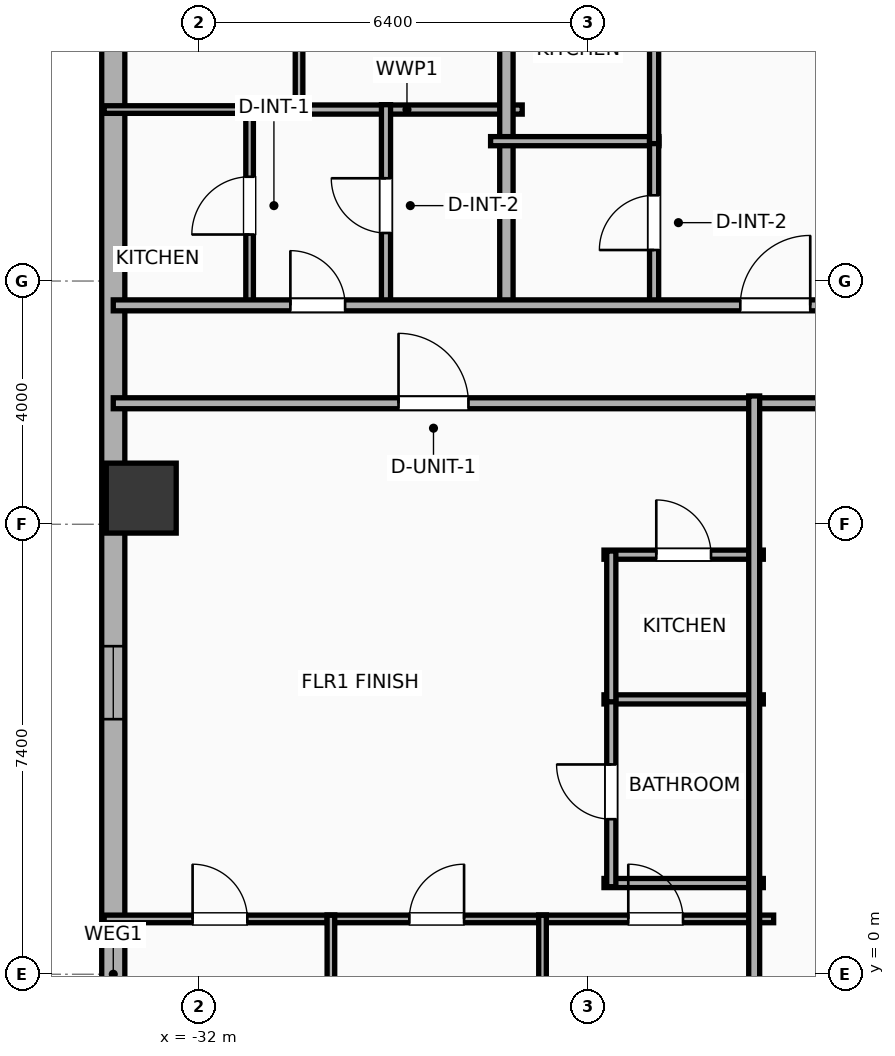
"""IFC4 building model, lengths in metres.
Left out: names, types, materials, properties, quantities, classifications, styles, units other than length and angle.
Written with IfcOpenShell. Run it as: python <this file> out.ifc"""

import sys

from ifc_helpers import new_model, si_unit, direction, frame, frame_2d, origin, origin_2d, place, context, subcontext, project, spatial, rectangle, hollow_rectangle, extrude, element, fill, save


model = new_model("IFC4")
c1 = context("Model", 3, precision=1e-05, world=origin(), true_north=direction((0.0, 1.0)))
c2 = subcontext(c1, "Body", "Model", "MODEL_VIEW")
j1 = project(units=[si_unit("LENGTHUNIT", "METRE"), si_unit("PLANEANGLEUNIT", "RADIAN")], contexts=[c1])
p1 = place(None, origin())
s1 = spatial("IfcSite", under=j1, at=p1, CompositionType="ELEMENT")
p2 = place(p1, origin())
s2 = spatial("IfcBuilding", under=s1, at=p2, CompositionType="ELEMENT")
p3 = place(p2, frame((0.0, 0.0, 65.0)))
s3 = spatial("IfcBuildingStorey", under=s2, at=p3, CompositionType="ELEMENT", Elevation=65.0)
p4 = place(p3, frame((-32.95, 7.83, 0.0), z_axis=(0.0, 0.0, 1.0), x_axis=(1.0, 0.0, 0.0)))
e1 = element("IfcColumn", 1, at=p4, inside=s3, PredefinedType="COLUMN", context=c2, shape_type="SweptSolid", body=[
    extrude(hollow_rectangle(XDim=1.15, YDim=1.15, WallThickness=0.04, at=origin_2d()), origin(), (0.0, 0.0, 1.0), 3.9),
])
p5 = place(p3, frame((-33.41, -18.381, 0.0), z_axis=(0.0, 0.0, 1.0), x_axis=(0.0, 1.0, 0.0)))
e2 = element("IfcWall", 2, at=p5, inside=s3, PredefinedType="ELEMENTEDWALL", context=c2, shape_type="SweptSolid", body=[
    extrude(rectangle(XDim=36.763, YDim=0.38, at=frame_2d((18.381, 0.0))), origin(), (0.0, 0.0, 1.0), 3.65),
])
p6 = place(p5, frame((33.637, 0.0, 0.75)))
e3 = element("IfcOpeningElement", 3, at=p6, cuts=e2, PredefinedType="OPENING", context=c2, shape_type="SweptSolid", body=[
    extrude(rectangle(XDim=1.2, YDim=2.05, at=frame_2d((0.6, 1.025))), frame((0.0, 0.2, 0.0), z_axis=(0.0, -1.0, 0.0), x_axis=(1.0, 0.0, 0.0)), (0.0, 0.0, 1.0), 0.4),
])
p7 = place(p5, frame((22.576, 0.0, 0.75)))
e4 = element("IfcOpeningElement", 4, at=p7, cuts=e2, PredefinedType="OPENING", context=c2, shape_type="SweptSolid", body=[
    extrude(rectangle(XDim=1.2, YDim=2.05, at=frame_2d((0.6, 1.025))), frame((0.0, 0.2, 0.0), z_axis=(0.0, -1.0, 0.0), x_axis=(1.0, 0.0, 0.0)), (0.0, 0.0, 1.0), 0.4),
])
p8 = place(p5, frame((13.126, 0.0, 0.75)))
e5 = element("IfcOpeningElement", 5, at=p8, cuts=e2, PredefinedType="OPENING", context=c2, shape_type="SweptSolid", body=[
    extrude(rectangle(XDim=1.2, YDim=2.05, at=frame_2d((0.6, 1.025))), frame((0.0, 0.2, 0.0), z_axis=(0.0, -1.0, 0.0), x_axis=(1.0, 0.0, 0.0)), (0.0, 0.0, 1.0), 0.4),
])
p9 = place(p3, frame((-33.41, 9.39, 0.0), z_axis=(0.0, 0.0, 1.0), x_axis=(1.0, 0.0, 0.0)))
e6 = element("IfcWall", 6, at=p9, inside=s3, PredefinedType="PARTITIONING", context=c2, shape_type="SweptSolid", body=[
    extrude(rectangle(XDim=23.53, YDim=0.18, at=frame_2d((11.765, 0.0))), origin(), (0.0, 0.0, 1.0), 3.65),
])
p10 = place(p9, frame((4.691, 0.0, 0.0)))
e7 = element("IfcOpeningElement", 7, at=p10, cuts=e6, PredefinedType="OPENING", context=c2, shape_type="SweptSolid", body=[
    extrude(rectangle(XDim=1.15, YDim=2.05, at=frame_2d((0.575, 1.025))), frame((0.0, 0.1, 0.0), z_axis=(0.0, -1.0, 0.0), x_axis=(1.0, 0.0, 0.0)), (0.0, 0.0, 1.0), 0.2),
])
p11 = place(p3, frame((-30.355, 14.14, 0.0), z_axis=(0.0, 0.0, 1.0), x_axis=(0.0, 1.0, 0.0)))
e8 = element("IfcWall", 8, at=p11, inside=s3, PredefinedType="PARTITIONING", context=c2, shape_type="SweptSolid", body=[
    extrude(rectangle(XDim=8.069, YDim=0.125, at=frame_2d((4.035, 0.0))), origin(), (0.0, 0.0, 1.0), 3.65),
])
p12 = place(p11, frame((1.487, 0.0, 0.0)))
e9 = element("IfcOpeningElement", 9, at=p12, cuts=e8, PredefinedType="OPENING", context=c2, shape_type="SweptSolid", body=[
    extrude(rectangle(XDim=0.9, YDim=2.05, at=frame_2d((0.45, 1.025))), frame((0.0, 0.073, 0.0), z_axis=(0.0, -1.0, 0.0), x_axis=(1.0, 0.0, 0.0)), (0.0, 0.0, 1.0), 0.145),
])
p13 = place(p3, frame((-30.475, 14.22, 0.0), z_axis=(0.0, 0.0, 1.0), x_axis=(1.0, 0.0, 0.0)))
e10 = element("IfcWall", 10, at=p13, inside=s3, PredefinedType="PLUMBINGWALL", context=c2, shape_type="SweptSolid", body=[
    extrude(rectangle(XDim=3.79, YDim=0.15, at=frame_2d((1.895, 0.0))), origin(), (0.0, 0.0, 1.0), 3.65),
])
p14 = place(p3, frame((-31.168, 10.98, 0.0), z_axis=(0.0, 0.0, 1.0), x_axis=(0.0, 1.0, 0.0)))
e11 = element("IfcWall", 11, at=p14, inside=s3, PredefinedType="PARTITIONING", context=c2, shape_type="SweptSolid", body=[
    extrude(rectangle(XDim=3.32, YDim=0.125, at=frame_2d((1.66, 0.0))), origin(), (0.0, 0.0, 1.0), 3.65),
])
p15 = place(p14, frame((1.185, 0.0, 0.0)))
e12 = element("IfcOpeningElement", 12, at=p15, cuts=e11, PredefinedType="OPENING", context=c2, shape_type="SweptSolid", body=[
    extrude(rectangle(XDim=0.95, YDim=2.05, at=frame_2d((0.475, 1.025))), frame((0.0, 0.073, 0.0), z_axis=(0.0, -1.0, 0.0), x_axis=(1.0, 0.0, 0.0)), (0.0, 0.0, 1.0), 0.145),
])
p16 = place(p3, frame((-33.56, 14.22, 0.0), z_axis=(0.0, 0.0, 1.0), x_axis=(1.0, 0.0, 0.0)))
e13 = element("IfcWall", 13, at=p16, inside=s3, PredefinedType="PARTITIONING", context=c2, shape_type="SweptSolid", body=[
    extrude(rectangle(XDim=2.512, YDim=0.125, at=frame_2d((1.256, 0.0))), origin(), (0.0, 0.0, 1.0), 3.65),
])
p17 = place(p3, frame((-28.925, 10.98, 0.0), z_axis=(0.0, 0.0, 1.0), x_axis=(0.0, 1.0, 0.0)))
e14 = element("IfcWall", 14, at=p17, inside=s3, PredefinedType="PLUMBINGWALL", context=c2, shape_type="SweptSolid", body=[
    extrude(rectangle(XDim=3.32, YDim=0.15, at=frame_2d((1.66, 0.0))), origin(), (0.0, 0.0, 1.0), 3.65),
])
p18 = place(p17, frame((1.21, 0.0, 0.0)))
e15 = element("IfcOpeningElement", 15, at=p18, cuts=e14, PredefinedType="OPENING", context=c2, shape_type="SweptSolid", body=[
    extrude(rectangle(XDim=0.9, YDim=2.05, at=frame_2d((0.45, 1.025))), frame((0.0, 0.085, 0.0), z_axis=(0.0, -1.0, 0.0), x_axis=(1.0, 0.0, 0.0)), (0.0, 0.0, 1.0), 0.17),
])
p19 = place(p3, frame((-26.945, 10.92, 0.0), z_axis=(0.0, 0.0, 1.0), x_axis=(0.0, 1.0, 0.0)))
e16 = element("IfcWall", 16, at=p19, inside=s3, PredefinedType="PARTITIONING", context=c2, shape_type="SweptSolid", body=[
    extrude(rectangle(XDim=11.29, YDim=0.22, at=frame_2d((5.645, 0.0))), origin(), (0.0, 0.0, 1.0), 3.65),
])
p20 = place(p3, frame((-27.205, 13.7, 0.0), z_axis=(0.0, 0.0, 1.0), x_axis=(1.0, 0.0, 0.0)))
e17 = element("IfcWall", 17, at=p20, inside=s3, PredefinedType="PLUMBINGWALL", context=c2, shape_type="SweptSolid", body=[
    extrude(rectangle(XDim=2.769, YDim=0.15, at=frame_2d((1.385, 0.0))), origin(), (0.0, 0.0, 1.0), 3.65),
])
p21 = place(p3, frame((-24.516, 10.98, 0.0), z_axis=(0.0, 0.0, 1.0), x_axis=(0.0, 1.0, 0.0)))
e18 = element("IfcWall", 18, at=p21, inside=s3, PredefinedType="PLUMBINGWALL", context=c2, shape_type="SweptSolid", body=[
    extrude(rectangle(XDim=2.76, YDim=0.15, at=frame_2d((1.38, 0.0))), origin(), (0.0, 0.0, 1.0), 3.65),
])
p22 = place(p21, frame((0.93, 0.0, 0.0)))
e19 = element("IfcOpeningElement", 19, at=p22, cuts=e18, PredefinedType="OPENING", context=c2, shape_type="SweptSolid", body=[
    extrude(rectangle(XDim=0.9, YDim=2.05, at=frame_2d((0.45, 1.025))), frame((0.0, 0.085, 0.0), z_axis=(0.0, -1.0, 0.0), x_axis=(1.0, 0.0, 0.0)), (0.0, 0.0, 1.0), 0.17),
])
p23 = place(p3, frame((-24.516, 13.66, 0.0), z_axis=(0.0, 0.0, 1.0), x_axis=(0.0, 1.0, 0.0)))
e20 = element("IfcWall", 20, at=p23, inside=s3, PredefinedType="PLUMBINGWALL", context=c2, shape_type="SweptSolid", body=[
    extrude(rectangle(XDim=8.598, YDim=0.15, at=frame_2d((4.299, 0.0))), origin(), (0.0, 0.0, 1.0), 3.65),
])
p24 = place(p23, frame((3.849, 0.0, 0.0)))
e21 = element("IfcOpeningElement", 21, at=p24, cuts=e20, PredefinedType="OPENING", context=c2, shape_type="SweptSolid", body=[
    extrude(rectangle(XDim=0.9, YDim=2.05, at=frame_2d((0.45, 1.025))), frame((0.0, 0.085, 0.0), z_axis=(0.0, -1.0, 0.0), x_axis=(1.0, 0.0, 0.0)), (0.0, 0.0, 1.0), 0.17),
])
p25 = place(p3, frame((-33.41, 11.0, 0.0), z_axis=(0.0, 0.0, 1.0), x_axis=(1.0, 0.0, 0.0)))
e22 = element("IfcWall", 22, at=p25, inside=s3, PredefinedType="PARTITIONING", context=c2, shape_type="SweptSolid", body=[
    extrude(rectangle(XDim=59.62, YDim=0.18, at=frame_2d((29.81, 0.0))), origin(), (0.0, 0.0, 1.0), 3.65),
])
p26 = place(p25, frame((2.913, 0.0, 0.0)))
e23 = element("IfcOpeningElement", 23, at=p26, cuts=e22, PredefinedType="OPENING", context=c2, shape_type="SweptSolid", body=[
    extrude(rectangle(XDim=0.9, YDim=2.05, at=frame_2d((0.45, 1.025))), frame((0.0, 0.1, 0.0), z_axis=(0.0, -1.0, 0.0), x_axis=(1.0, 0.0, 0.0)), (0.0, 0.0, 1.0), 0.2),
])
p27 = place(p25, frame((10.312, 0.0, 0.0)))
e24 = element("IfcOpeningElement", 24, at=p27, cuts=e22, PredefinedType="OPENING", context=c2, shape_type="SweptSolid", body=[
    extrude(rectangle(XDim=1.15, YDim=2.05, at=frame_2d((0.575, 1.025))), frame((0.0, 0.1, 0.0), z_axis=(0.0, -1.0, 0.0), x_axis=(1.0, 0.0, 0.0)), (0.0, 0.0, 1.0), 0.2),
])
p28 = place(p25, frame((15.85, 0.0, 0.0)))
e25 = element("IfcOpeningElement", 25, at=p28, cuts=e22, PredefinedType="OPENING", context=c2, shape_type="SweptSolid", body=[
    extrude(rectangle(XDim=0.9, YDim=2.05, at=frame_2d((0.45, 1.025))), frame((0.0, 0.1, 0.0), z_axis=(0.0, -1.0, 0.0), x_axis=(1.0, 0.0, 0.0)), (0.0, 0.0, 1.0), 0.2),
])
p29 = place(p25, frame((22.623, 0.0, 0.0)))
e26 = element("IfcOpeningElement", 26, at=p29, cuts=e22, PredefinedType="OPENING", context=c2, shape_type="SweptSolid", body=[
    extrude(rectangle(XDim=0.9, YDim=2.05, at=frame_2d((0.45, 1.025))), frame((0.0, 0.1, 0.0), z_axis=(0.0, -1.0, 0.0), x_axis=(1.0, 0.0, 0.0)), (0.0, 0.0, 1.0), 0.2),
])
p30 = place(p25, frame((29.622, 0.0, 0.0)))
e27 = element("IfcOpeningElement", 27, at=p30, cuts=e22, PredefinedType="OPENING", context=c2, shape_type="SweptSolid", body=[
    extrude(rectangle(XDim=0.9, YDim=2.05, at=frame_2d((0.45, 1.025))), frame((0.0, 0.1, 0.0), z_axis=(0.0, -1.0, 0.0), x_axis=(1.0, 0.0, 0.0)), (0.0, 0.0, 1.0), 0.2),
])
p31 = place(p25, frame((36.628, 0.0, 0.0)))
e28 = element("IfcOpeningElement", 28, at=p31, cuts=e22, PredefinedType="OPENING", context=c2, shape_type="SweptSolid", body=[
    extrude(rectangle(XDim=0.9, YDim=2.05, at=frame_2d((0.45, 1.025))), frame((0.0, 0.1, 0.0), z_axis=(0.0, -1.0, 0.0), x_axis=(1.0, 0.0, 0.0)), (0.0, 0.0, 1.0), 0.2),
])
p32 = place(p25, frame((43.627, 0.0, 0.0)))
e29 = element("IfcOpeningElement", 29, at=p32, cuts=e22, PredefinedType="OPENING", context=c2, shape_type="SweptSolid", body=[
    extrude(rectangle(XDim=0.9, YDim=2.05, at=frame_2d((0.45, 1.025))), frame((0.0, 0.1, 0.0), z_axis=(0.0, -1.0, 0.0), x_axis=(1.0, 0.0, 0.0)), (0.0, 0.0, 1.0), 0.2),
])
p33 = place(p25, frame((48.617, 0.0, 0.0)))
e30 = element("IfcOpeningElement", 30, at=p33, cuts=e22, PredefinedType="OPENING", context=c2, shape_type="SweptSolid", body=[
    extrude(rectangle(XDim=1.15, YDim=2.05, at=frame_2d((0.575, 1.025))), frame((0.0, 0.1, 0.0), z_axis=(0.0, -1.0, 0.0), x_axis=(1.0, 0.0, 0.0)), (0.0, 0.0, 1.0), 0.2),
])
p34 = place(p25, frame((56.272, 0.0, 0.0)))
e31 = element("IfcOpeningElement", 31, at=p34, cuts=e22, PredefinedType="OPENING", context=c2, shape_type="SweptSolid", body=[
    extrude(rectangle(XDim=0.9, YDim=2.05, at=frame_2d((0.45, 1.025))), frame((0.0, 0.1, 0.0), z_axis=(0.0, -1.0, 0.0), x_axis=(1.0, 0.0, 0.0)), (0.0, 0.0, 1.0), 0.2),
])
p35 = place(p3, frame((-25.34, 6.9, 0.0), z_axis=(0.0, 0.0, 1.0), x_axis=(1.0, 0.0, 0.0)))
e32 = element("IfcWall", 32, at=p35, inside=s3, PredefinedType="PLUMBINGWALL", context=c2, shape_type="SweptSolid", body=[
    extrude(rectangle(XDim=2.62, YDim=0.15, at=frame_2d((1.31, 0.0))), origin(), (0.0, 0.0, 1.0), 3.65),
])
p36 = place(p35, frame((0.86, 0.0, 0.0)))
e33 = element("IfcOpeningElement", 33, at=p36, cuts=e32, PredefinedType="OPENING", context=c2, shape_type="SweptSolid", body=[
    extrude(rectangle(XDim=0.9, YDim=2.05, at=frame_2d((0.45, 1.025))), frame((0.0, 0.085, 0.0), z_axis=(0.0, -1.0, 0.0), x_axis=(1.0, 0.0, 0.0)), (0.0, 0.0, 1.0), 0.17),
])
for number, where, z_axis, x_axis in (
    (34, (-25.34, 4.52, 0.0), (0.0, 0.0, 1.0), (1.0, 0.0, 0.0)),
    (35, (-25.34, 1.5, 0.0), (0.0, 0.0, 1.0), (1.0, 0.0, 0.0)),
):
    element("IfcWall", number, at=place(p3, frame(where, z_axis=z_axis, x_axis=x_axis)), inside=s3, PredefinedType="PLUMBINGWALL", context=c2, shape_type="SweptSolid", body=[
        extrude(rectangle(XDim=2.62, YDim=0.15, at=frame_2d((1.31, 0.0))), origin(), (0.0, 0.0, 1.0), 3.65),
    ])
p37 = place(p3, frame((-25.22, 1.44, 0.0), z_axis=(0.0, 0.0, 1.0), x_axis=(0.0, 1.0, 0.0)))
e36 = element("IfcWall", 36, at=p37, inside=s3, PredefinedType="PLUMBINGWALL", context=c2, shape_type="SweptSolid", body=[
    extrude(rectangle(XDim=3.12, YDim=0.15, at=frame_2d((1.56, 0.0))), origin(), (0.0, 0.0, 1.0), 3.65),
])
p38 = place(p37, frame((1.11, 0.0, 0.0)))
e37 = element("IfcOpeningElement", 37, at=p38, cuts=e36, PredefinedType="OPENING", context=c2, shape_type="SweptSolid", body=[
    extrude(rectangle(XDim=0.9, YDim=2.05, at=frame_2d((0.45, 1.025))), frame((0.0, 0.085, 0.0), z_axis=(0.0, -1.0, 0.0), x_axis=(1.0, 0.0, 0.0)), (0.0, 0.0, 1.0), 0.17),
])
p39 = place(p3, frame((-25.22, 4.48, 0.0), z_axis=(0.0, 0.0, 1.0), x_axis=(0.0, 1.0, 0.0)))
e38 = element("IfcWall", 38, at=p39, inside=s3, PredefinedType="PLUMBINGWALL", context=c2, shape_type="SweptSolid", body=[
    extrude(rectangle(XDim=2.48, YDim=0.15, at=frame_2d((1.24, 0.0))), origin(), (0.0, 0.0, 1.0), 3.65),
])
p40 = place(p3, frame((-33.56, 0.91, 0.0), z_axis=(0.0, 0.0, 1.0), x_axis=(1.0, 0.0, 0.0)))
e39 = element("IfcWall", 39, at=p40, inside=s3, PredefinedType="PARTITIONING", context=c2, shape_type="SweptSolid", body=[
    extrude(rectangle(XDim=3.792, YDim=0.125, at=frame_2d((1.896, 0.0))), origin(), (0.0, 0.0, 1.0), 3.65),
])
p41 = place(p40, frame((1.455, 0.0, 0.0)))
e40 = element("IfcOpeningElement", 40, at=p41, cuts=e39, PredefinedType="OPENING", context=c2, shape_type="SweptSolid", body=[
    extrude(rectangle(XDim=0.9, YDim=2.05, at=frame_2d((0.45, 1.025))), frame((0.0, 0.073, 0.0), z_axis=(0.0, -1.0, 0.0), x_axis=(1.0, 0.0, 0.0)), (0.0, 0.0, 1.0), 0.145),
])
p42 = place(p3, frame((-29.894, 0.91, 0.0), z_axis=(0.0, 0.0, 1.0), x_axis=(1.0, 0.0, 0.0)))
e41 = element("IfcWall", 41, at=p42, inside=s3, PredefinedType="PARTITIONING", context=c2, shape_type="SweptSolid", body=[
    extrude(rectangle(XDim=3.605, YDim=0.125, at=frame_2d((1.802, 0.0))), origin(), (0.0, 0.0, 1.0), 3.65),
])
p43 = place(p42, frame((1.353, 0.0, 0.0)))
e42 = element("IfcOpeningElement", 42, at=p43, cuts=e41, PredefinedType="OPENING", context=c2, shape_type="SweptSolid", body=[
    extrude(rectangle(XDim=0.9, YDim=2.05, at=frame_2d((0.45, 1.025))), frame((0.0, 0.073, 0.0), z_axis=(0.0, -1.0, 0.0), x_axis=(1.0, 0.0, 0.0)), (0.0, 0.0, 1.0), 0.145),
])
p44 = place(p3, frame((-26.414, 0.91, 0.0), z_axis=(0.0, 0.0, 1.0), x_axis=(1.0, 0.0, 0.0)))
e43 = element("IfcWall", 43, at=p44, inside=s3, PredefinedType="PARTITIONING", context=c2, shape_type="SweptSolid", body=[
    extrude(rectangle(XDim=3.864, YDim=0.125, at=frame_2d((1.932, 0.0))), origin(), (0.0, 0.0, 1.0), 3.65),
])
p45 = place(p44, frame((1.473, 0.0, 0.0)))
e44 = element("IfcOpeningElement", 44, at=p45, cuts=e43, PredefinedType="OPENING", context=c2, shape_type="SweptSolid", body=[
    extrude(rectangle(XDim=0.9, YDim=2.05, at=frame_2d((0.45, 1.025))), frame((0.0, 0.073, 0.0), z_axis=(0.0, -1.0, 0.0), x_axis=(1.0, 0.0, 0.0)), (0.0, 0.0, 1.0), 0.145),
])
for number, where, z_axis, x_axis in (
    (45, (-26.351, -9.71, 0.0), (0.0, 0.0, 1.0), (0.0, 1.0, 0.0)),
    (46, (-29.831, -9.71, 0.0), (0.0, 0.0, 1.0), (0.0, 1.0, 0.0)),
):
    element("IfcWall", number, at=place(p3, frame(where, z_axis=z_axis, x_axis=x_axis)), inside=s3, PredefinedType="PARTITIONING", context=c2, shape_type="SweptSolid", body=[
        extrude(rectangle(XDim=10.68, YDim=0.125, at=frame_2d((5.34, 0.0))), origin(), (0.0, 0.0, 1.0), 3.65),
    ])
p46 = place(p3, frame((-22.87, -9.51, 0.0), z_axis=(0.0, 0.0, 1.0), x_axis=(0.0, 1.0, 0.0)))
e47 = element("IfcWall", 47, at=p46, inside=s3, PredefinedType="PARTITIONING", context=c2, shape_type="SweptSolid", body=[
    extrude(rectangle(XDim=19.02, YDim=0.18, at=frame_2d((9.51, 0.0))), origin(), (0.0, 0.0, 1.0), 3.65),
])
p47 = place(p7, origin())
e48 = element("IfcWindow", 48, at=p47, inside=s3, PartitioningType="SINGLE_PANEL", PredefinedType="WINDOW", context=c2, shape_type="SweptSolid", body=[
    extrude(rectangle(XDim=1.2, YDim=2.05, at=frame_2d((0.6, 1.025))), frame((0.0, 0.03, 0.0), z_axis=(0.0, -1.0, 0.0), x_axis=(1.0, 0.0, 0.0)), (0.0, 0.0, 1.0), 0.06),
])
fill(e4, e48)
p48 = place(p10, origin())
e49 = element("IfcDoor", 49, at=p48, inside=s3, OperationType="SINGLE_SWING_LEFT", PredefinedType="DOOR", context=c2, shape_type="SweptSolid", body=[
    extrude(rectangle(XDim=1.15, YDim=2.05, at=frame_2d((0.575, 1.025))), frame((0.0, 0.025, 0.0), z_axis=(0.0, -1.0, 0.0), x_axis=(1.0, 0.0, 0.0)), (0.0, 0.0, 1.0), 0.05),
])
fill(e7, e49)
p49 = place(p15, origin())
e50 = element("IfcDoor", 50, at=p49, inside=s3, OperationType="SINGLE_SWING_LEFT", PredefinedType="DOOR", context=c2, shape_type="SweptSolid", body=[
    extrude(rectangle(XDim=0.95, YDim=2.05, at=frame_2d((0.475, 1.025))), frame((0.0, 0.025, 0.0), z_axis=(0.0, -1.0, 0.0), x_axis=(1.0, 0.0, 0.0)), (0.0, 0.0, 1.0), 0.05),
])
fill(e12, e50)
p50 = place(p18, origin())
e51 = element("IfcDoor", 51, at=p50, inside=s3, OperationType="SINGLE_SWING_RIGHT", PredefinedType="DOOR", context=c2, shape_type="SweptSolid", body=[
    extrude(rectangle(XDim=0.9, YDim=2.05, at=frame_2d((0.45, 1.025))), frame((0.0, 0.025, 0.0), z_axis=(0.0, -1.0, 0.0), x_axis=(1.0, 0.0, 0.0)), (0.0, 0.0, 1.0), 0.05),
])
fill(e15, e51)
p51 = place(p22, origin())
e52 = element("IfcDoor", 52, at=p51, inside=s3, OperationType="SINGLE_SWING_LEFT", PredefinedType="DOOR", context=c2, shape_type="SweptSolid", body=[
    extrude(rectangle(XDim=0.9, YDim=2.05, at=frame_2d((0.45, 1.025))), frame((0.0, 0.025, 0.0), z_axis=(0.0, -1.0, 0.0), x_axis=(1.0, 0.0, 0.0)), (0.0, 0.0, 1.0), 0.05),
])
fill(e19, e52)
p52 = place(p26, origin())
e53 = element("IfcDoor", 53, at=p52, inside=s3, OperationType="SINGLE_SWING_LEFT", PredefinedType="DOOR", context=c2, shape_type="SweptSolid", body=[
    extrude(rectangle(XDim=0.9, YDim=2.05, at=frame_2d((0.45, 1.025))), frame((0.0, 0.025, 0.0), z_axis=(0.0, -1.0, 0.0), x_axis=(1.0, 0.0, 0.0)), (0.0, 0.0, 1.0), 0.05),
])
fill(e23, e53)
p53 = place(p27, origin())
e54 = element("IfcDoor", 54, at=p53, inside=s3, OperationType="SINGLE_SWING_RIGHT", PredefinedType="DOOR", context=c2, shape_type="SweptSolid", body=[
    extrude(rectangle(XDim=1.15, YDim=2.05, at=frame_2d((0.575, 1.025))), frame((0.0, 0.025, 0.0), z_axis=(0.0, -1.0, 0.0), x_axis=(1.0, 0.0, 0.0)), (0.0, 0.0, 1.0), 0.05),
])
fill(e24, e54)
p54 = place(p36, origin())
e55 = element("IfcDoor", 55, at=p54, inside=s3, OperationType="SINGLE_SWING_LEFT", PredefinedType="DOOR", context=c2, shape_type="SweptSolid", body=[
    extrude(rectangle(XDim=0.9, YDim=2.05, at=frame_2d((0.45, 1.025))), frame((0.0, 0.025, 0.0), z_axis=(0.0, -1.0, 0.0), x_axis=(1.0, 0.0, 0.0)), (0.0, 0.0, 1.0), 0.05),
])
fill(e33, e55)
p55 = place(p38, origin())
e56 = element("IfcDoor", 56, at=p55, inside=s3, OperationType="SINGLE_SWING_RIGHT", PredefinedType="DOOR", context=c2, shape_type="SweptSolid", body=[
    extrude(rectangle(XDim=0.9, YDim=2.05, at=frame_2d((0.45, 1.025))), frame((0.0, 0.025, 0.0), z_axis=(0.0, -1.0, 0.0), x_axis=(1.0, 0.0, 0.0)), (0.0, 0.0, 1.0), 0.05),
])
fill(e37, e56)
p56 = place(p41, origin())
e57 = element("IfcDoor", 57, at=p56, inside=s3, OperationType="SINGLE_SWING_LEFT", PredefinedType="DOOR", context=c2, shape_type="SweptSolid", body=[
    extrude(rectangle(XDim=0.9, YDim=2.05, at=frame_2d((0.45, 1.025))), frame((0.0, 0.025, 0.0), z_axis=(0.0, -1.0, 0.0), x_axis=(1.0, 0.0, 0.0)), (0.0, 0.0, 1.0), 0.05),
])
fill(e40, e57)
p57 = place(p43, origin())
e58 = element("IfcDoor", 58, at=p57, inside=s3, OperationType="SINGLE_SWING_RIGHT", PredefinedType="DOOR", context=c2, shape_type="SweptSolid", body=[
    extrude(rectangle(XDim=0.9, YDim=2.05, at=frame_2d((0.45, 1.025))), frame((0.0, 0.025, 0.0), z_axis=(0.0, -1.0, 0.0), x_axis=(1.0, 0.0, 0.0)), (0.0, 0.0, 1.0), 0.05),
])
fill(e42, e58)
p58 = place(p45, origin())
e59 = element("IfcDoor", 59, at=p58, inside=s3, OperationType="SINGLE_SWING_LEFT", PredefinedType="DOOR", context=c2, shape_type="SweptSolid", body=[
    extrude(rectangle(XDim=0.9, YDim=2.05, at=frame_2d((0.45, 1.025))), frame((0.0, 0.025, 0.0), z_axis=(0.0, -1.0, 0.0), x_axis=(1.0, 0.0, 0.0)), (0.0, 0.0, 1.0), 0.05),
])
fill(e44, e59)
save(model, sys.argv[1])
